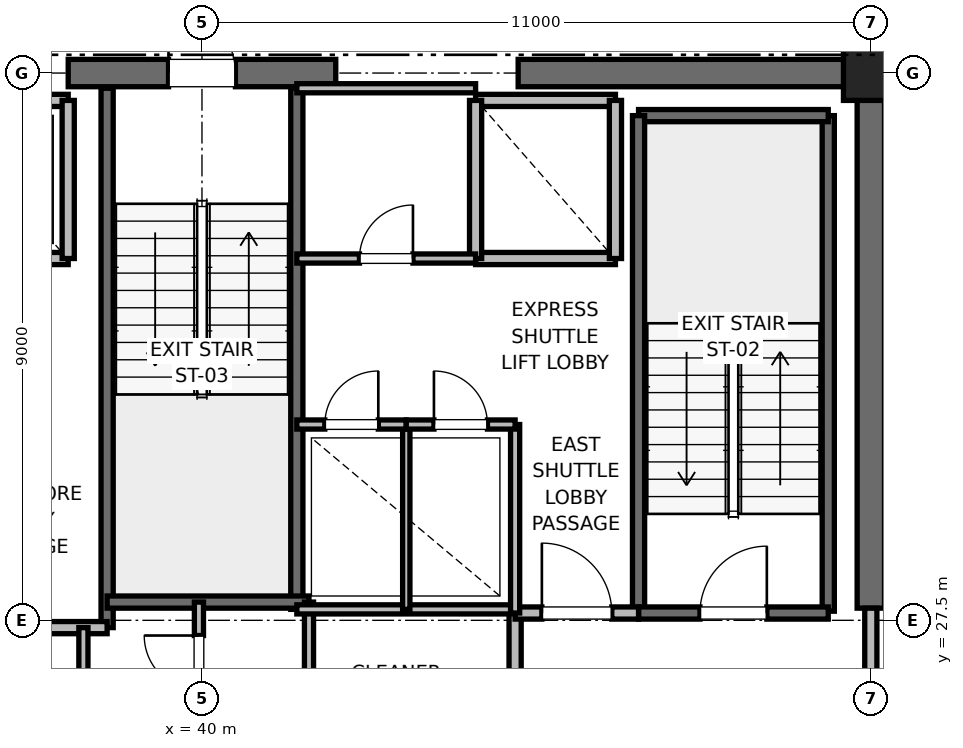
"""IFC4 building model, lengths in metres.
Left out: names, types, materials, properties, quantities, classifications, styles, units other than length and angle.
Written with IfcOpenShell. Run it as: python <this file> out.ifc"""

import sys

from ifc_helpers import new_model, si_unit, direction, frame, frame_2d, origin, origin_2d, place, context, subcontext, project, spatial, rectangle, extrude, element, fill, save


model = new_model("IFC4")
c1 = context("Model", 3, precision=1e-05, world=origin(), true_north=direction((0.0, 1.0)))
c2 = subcontext(c1, "Body", "Model", "MODEL_VIEW")
j1 = project(units=[si_unit("LENGTHUNIT", "METRE"), si_unit("PLANEANGLEUNIT", "RADIAN")], contexts=[c1])
p1 = place(None, origin())
s1 = spatial("IfcSite", under=j1, at=p1, CompositionType="ELEMENT")
p2 = place(p1, origin())
s2 = spatial("IfcBuilding", under=s1, at=p2, CompositionType="ELEMENT")
p3 = place(p2, frame((0.0, 0.0, 279.2)))
s3 = spatial("IfcBuildingStorey", under=s2, at=p3, CompositionType="ELEMENT", Elevation=279.2)
p4 = place(p3, frame((51.0, 36.5, 0.0), z_axis=(0.0, 0.0, 1.0), x_axis=(1.0, 0.0, 0.0)))
e1 = element("IfcColumn", 1, at=p4, inside=s3, PredefinedType="PILASTER", context=c2, shape_type="SweptSolid", body=[
    extrude(rectangle(XDim=0.9, YDim=0.9, at=origin_2d()), origin(), (0.0, 0.0, 1.0), 4.0),
])
p5 = place(p3, frame((37.8, 36.5, 0.0), z_axis=(0.0, 0.0, 1.0), x_axis=(1.0, 0.0, 0.0)))
e2 = element("IfcWall", 2, at=p5, inside=s3, PredefinedType="SHEAR", context=c2, shape_type="SweptSolid", body=[
    extrude(rectangle(XDim=4.4, YDim=0.45, at=frame_2d((2.2, 0.0))), origin(), (0.0, 0.0, 1.0), 3.785),
])
p6 = place(p5, frame((1.65, 0.0, 0.0)))
e3 = element("IfcOpeningElement", 3, at=p6, cuts=e2, PredefinedType="OPENING", context=c2, shape_type="SweptSolid", body=[
    extrude(rectangle(XDim=1.1, YDim=2.15, at=frame_2d((0.55, 1.075))), frame((0.0, 0.225, 0.0), z_axis=(0.0, -1.0, 0.0), x_axis=(1.0, 0.0, 0.0)), (0.0, 0.0, 1.0), 0.45),
])
p7 = place(p3, frame((45.2, 36.5, 0.0), z_axis=(0.0, 0.0, 1.0), x_axis=(1.0, 0.0, 0.0)))
e4 = element("IfcWall", 4, at=p7, inside=s3, PredefinedType="SHEAR", context=c2, shape_type="SweptSolid", body=[
    extrude(rectangle(XDim=5.8, YDim=0.45, at=frame_2d((2.9, 0.0))), origin(), (0.0, 0.0, 1.0), 3.785),
])
p8 = place(p3, frame((51.0, 27.7, 0.0), z_axis=(0.0, 0.0, 1.0), x_axis=(0.0, 1.0, 0.0)))
e5 = element("IfcWall", 5, at=p8, inside=s3, PredefinedType="SHEAR", context=c2, shape_type="SweptSolid", body=[
    extrude(rectangle(XDim=8.8, YDim=0.45, at=frame_2d((4.4, 0.0))), origin(), (0.0, 0.0, 1.0), 3.785),
])
p9 = place(p3, frame((50.3, 27.65, 0.0), z_axis=(0.0, 0.0, 1.0), x_axis=(0.0, 1.0, 0.0)))
e6 = element("IfcWall", 6, at=p9, inside=s3, PredefinedType="SOLIDWALL", context=c2, shape_type="SweptSolid", body=[
    extrude(rectangle(XDim=8.15, YDim=0.2, at=frame_2d((4.075, 0.0))), origin(), (0.0, 0.0, 1.0), 3.785),
])
p10 = place(p3, frame((47.18, 35.8, 0.0), z_axis=(0.0, 0.0, 1.0), x_axis=(1.0, 0.0, 0.0)))
e7 = element("IfcWall", 7, at=p10, inside=s3, PredefinedType="SOLIDWALL", context=c2, shape_type="SweptSolid", body=[
    extrude(rectangle(XDim=3.12, YDim=0.2, at=frame_2d((1.56, 0.0))), origin(), (0.0, 0.0, 1.0), 3.785),
])
p11 = place(p3, frame((47.18, 27.62, 0.0), z_axis=(0.0, 0.0, 1.0), x_axis=(0.0, 1.0, 0.0)))
e8 = element("IfcWall", 8, at=p11, inside=s3, PredefinedType="SOLIDWALL", context=c2, shape_type="SweptSolid", body=[
    extrude(rectangle(XDim=8.18, YDim=0.2, at=frame_2d((4.09, 0.0))), origin(), (0.0, 0.0, 1.0), 3.785),
])
p12 = place(p3, frame((47.18, 27.62, 0.0), z_axis=(0.0, 0.0, 1.0), x_axis=(1.0, 0.0, 0.0)))
e9 = element("IfcWall", 9, at=p12, inside=s3, PredefinedType="SOLIDWALL", context=c2, shape_type="SweptSolid", body=[
    extrude(rectangle(XDim=3.12, YDim=0.2, at=frame_2d((1.56, 0.0))), origin(), (0.0, 0.0, 1.0), 3.785),
])
p13 = place(p12, frame((1.01, 0.0, 0.0)))
e10 = element("IfcOpeningElement", 10, at=p13, cuts=e9, PredefinedType="OPENING", context=c2, shape_type="SweptSolid", body=[
    extrude(rectangle(XDim=1.1, YDim=2.15, at=frame_2d((0.55, 1.075))), frame((0.0, 0.1, 0.0), z_axis=(0.0, -1.0, 0.0), x_axis=(1.0, 0.0, 0.0)), (0.0, 0.0, 1.0), 0.2),
])
p14 = place(p3, frame((38.44, 27.38, 0.0), z_axis=(0.0, 0.0, 1.0), x_axis=(0.0, 1.0, 0.0)))
e11 = element("IfcWall", 11, at=p14, inside=s3, PredefinedType="SOLIDWALL", context=c2, shape_type="SweptSolid", body=[
    extrude(rectangle(XDim=8.87, YDim=0.2, at=frame_2d((4.435, 0.0))), origin(), (0.0, 0.0, 1.0), 3.785),
])
p15 = place(p3, frame((41.56, 27.68, 0.0), z_axis=(0.0, 0.0, 1.0), x_axis=(0.0, 1.0, 0.0)))
e12 = element("IfcWall", 12, at=p15, inside=s3, PredefinedType="SOLIDWALL", context=c2, shape_type="SweptSolid", body=[
    extrude(rectangle(XDim=8.57, YDim=0.2, at=frame_2d((4.285, 0.0))), origin(), (0.0, 0.0, 1.0), 3.785),
])
p16 = place(p3, frame((38.44, 27.8, 0.0), z_axis=(0.0, 0.0, 1.0), x_axis=(1.0, 0.0, 0.0)))
e13 = element("IfcWall", 13, at=p16, inside=s3, PredefinedType="SOLIDWALL", context=c2, shape_type="SweptSolid", body=[
    extrude(rectangle(XDim=3.32, YDim=0.2, at=frame_2d((1.66, 0.0))), origin(), (0.0, 0.0, 1.0), 3.785),
])
p17 = place(p3, frame((32.82, 27.38, 0.0), z_axis=(0.0, 0.0, 1.0), x_axis=(1.0, 0.0, 0.0)))
e14 = element("IfcWall", 14, at=p17, inside=s3, PredefinedType="PARTITIONING", context=c2, shape_type="SweptSolid", body=[
    extrude(rectangle(XDim=5.62, YDim=0.2, at=frame_2d((2.81, 0.0))), origin(), (0.0, 0.0, 1.0), 3.785),
])
p18 = place(p3, frame((45.15, 24.25, 0.0), z_axis=(0.0, 0.0, 1.0), x_axis=(0.0, 1.0, 0.0)))
e15 = element("IfcWall", 15, at=p18, inside=s3, PredefinedType="PARTITIONING", context=c2, shape_type="SweptSolid", body=[
    extrude(rectangle(XDim=3.37, YDim=0.2, at=frame_2d((1.685, 0.0))), origin(), (0.0, 0.0, 1.0), 3.785),
])
p19 = place(p3, frame((45.15, 27.62, 0.0), z_axis=(0.0, 0.0, 1.0), x_axis=(1.0, 0.0, 0.0)))
e16 = element("IfcWall", 16, at=p19, inside=s3, PredefinedType="PARTITIONING", context=c2, shape_type="SweptSolid", body=[
    extrude(rectangle(XDim=2.03, YDim=0.2, at=frame_2d((1.015, 0.0))), origin(), (0.0, 0.0, 1.0), 3.785),
])
p20 = place(p19, frame((0.44, 0.0, 0.0)))
e17 = element("IfcOpeningElement", 17, at=p20, cuts=e16, PredefinedType="OPENING", context=c2, shape_type="SweptSolid", body=[
    extrude(rectangle(XDim=1.15, YDim=2.2, at=frame_2d((0.575, 1.1))), frame((0.0, 0.1, 0.0), z_axis=(0.0, -1.0, 0.0), x_axis=(1.0, 0.0, 0.0)), (0.0, 0.0, 1.0), 0.2),
])
p21 = place(p3, frame((51.0, 24.3, 0.0), z_axis=(0.0, 0.0, 1.0), x_axis=(0.0, 1.0, 0.0)))
e18 = element("IfcWall", 18, at=p21, inside=s3, PredefinedType="PARTITIONING", context=c2, shape_type="SweptSolid", body=[
    extrude(rectangle(XDim=3.4, YDim=0.2, at=frame_2d((1.7, 0.0))), origin(), (0.0, 0.0, 1.0), 2.865),
])
p22 = place(p21, frame((1.125, 0.0, 0.0)))
e19 = element("IfcOpeningElement", 19, at=p22, cuts=e18, PredefinedType="OPENING", context=c2, shape_type="SweptSolid", body=[
    extrude(rectangle(XDim=1.15, YDim=2.2, at=frame_2d((0.575, 1.1))), frame((0.0, 0.1, 0.0), z_axis=(0.0, -1.0, 0.0), x_axis=(1.0, 0.0, 0.0)), (0.0, 0.0, 1.0), 0.2),
])
p23 = place(p3, frame((35.5, 33.45, 0.0), z_axis=(0.0, 0.0, 1.0), x_axis=(1.0, 0.0, 0.0)))
e20 = element("IfcWall", 20, at=p23, inside=s3, PredefinedType="SOLIDWALL", context=c2, shape_type="SweptSolid", body=[
    extrude(rectangle(XDim=2.3, YDim=0.2, at=frame_2d((1.15, 0.0))), origin(), (0.0, 0.0, 1.0), 3.785),
])
p24 = place(p23, frame((0.6, 0.0, 0.0)))
e21 = element("IfcOpeningElement", 21, at=p24, cuts=e20, PredefinedType="OPENING", context=c2, shape_type="SweptSolid", body=[
    extrude(rectangle(XDim=1.1, YDim=2.2, at=frame_2d((0.55, 1.1))), frame((0.0, 0.1, 0.0), z_axis=(0.0, -1.0, 0.0), x_axis=(1.0, 0.0, 0.0)), (0.0, 0.0, 1.0), 0.2),
])
p25 = place(p3, frame((37.8, 36.05, 0.0), z_axis=(0.0, 0.0, 1.0), x_axis=(-1.0, 0.0, 0.0)))
e22 = element("IfcWall", 22, at=p25, inside=s3, PredefinedType="SOLIDWALL", context=c2, shape_type="SweptSolid", body=[
    extrude(rectangle(XDim=2.3, YDim=0.2, at=frame_2d((1.15, 0.0))), origin(), (0.0, 0.0, 1.0), 2.865),
])
p26 = place(p3, frame((37.8, 33.45, 0.0), z_axis=(0.0, 0.0, 1.0), x_axis=(0.0, 1.0, 0.0)))
e23 = element("IfcWall", 23, at=p26, inside=s3, PredefinedType="SOLIDWALL", context=c2, shape_type="SweptSolid", body=[
    extrude(rectangle(XDim=2.6, YDim=0.2, at=frame_2d((1.3, 0.0))), origin(), (0.0, 0.0, 1.0), 2.865),
])
p27 = place(p3, frame((44.5, 33.45, 0.0), z_axis=(0.0, 0.0, 1.0), x_axis=(1.0, 0.0, 0.0)))
e24 = element("IfcWall", 24, at=p27, inside=s3, PredefinedType="SOLIDWALL", context=c2, shape_type="SweptSolid", body=[
    extrude(rectangle(XDim=2.3, YDim=0.2, at=frame_2d((1.15, 0.0))), origin(), (0.0, 0.0, 1.0), 3.785),
])
p28 = place(p3, frame((46.8, 36.05, 0.0), z_axis=(0.0, 0.0, 1.0), x_axis=(-1.0, 0.0, 0.0)))
e25 = element("IfcWall", 25, at=p28, inside=s3, PredefinedType="SOLIDWALL", context=c2, shape_type="SweptSolid", body=[
    extrude(rectangle(XDim=2.3, YDim=0.2, at=frame_2d((1.15, 0.0))), origin(), (0.0, 0.0, 1.0), 2.865),
])
p29 = place(p3, frame((44.5, 36.05, 0.0), z_axis=(0.0, 0.0, 1.0), x_axis=(0.0, -1.0, 0.0)))
e26 = element("IfcWall", 26, at=p29, inside=s3, PredefinedType="SOLIDWALL", context=c2, shape_type="SweptSolid", body=[
    extrude(rectangle(XDim=2.6, YDim=0.2, at=frame_2d((1.3, 0.0))), origin(), (0.0, 0.0, 1.0), 2.865),
])
p30 = place(p3, frame((46.8, 33.45, 0.0), z_axis=(0.0, 0.0, 1.0), x_axis=(0.0, 1.0, 0.0)))
e27 = element("IfcWall", 27, at=p30, inside=s3, PredefinedType="SOLIDWALL", context=c2, shape_type="SweptSolid", body=[
    extrude(rectangle(XDim=2.6, YDim=0.2, at=frame_2d((1.3, 0.0))), origin(), (0.0, 0.0, 1.0), 3.785),
])
p31 = place(p3, frame((41.76, 23.8, 0.0), z_axis=(0.0, 0.0, 1.0), x_axis=(0.0, 1.0, 0.0)))
e28 = element("IfcWall", 28, at=p31, inside=s3, PredefinedType="PARTITIONING", context=c2, shape_type="SweptSolid", body=[
    extrude(rectangle(XDim=4.0, YDim=0.15, at=frame_2d((2.0, 0.0))), origin(), (0.0, 0.0, 1.0), 2.85),
])
p32 = place(p3, frame((39.95, 25.8, 0.0), z_axis=(0.0, 0.0, 1.0), x_axis=(0.0, 1.0, 0.0)))
e29 = element("IfcWall", 29, at=p32, inside=s3, PredefinedType="PARTITIONING", context=c2, shape_type="SweptSolid", body=[
    extrude(rectangle(XDim=2.0, YDim=0.15, at=frame_2d((1.0, 0.0))), origin(), (0.0, 0.0, 1.0), 2.85),
])
p33 = place(p32, frame((0.55, 0.0, 0.0)))
e30 = element("IfcOpeningElement", 30, at=p33, cuts=e29, PredefinedType="OPENING", context=c2, shape_type="SweptSolid", body=[
    extrude(rectangle(XDim=0.9, YDim=2.1, at=frame_2d((0.45, 1.05))), frame((0.0, 0.075, 0.0), z_axis=(0.0, -1.0, 0.0), x_axis=(1.0, 0.0, 0.0)), (0.0, 0.0, 1.0), 0.15),
])
p34 = place(p3, frame((38.05, 23.06, 0.0), z_axis=(0.0, 0.0, 1.0), x_axis=(0.0, 1.0, 0.0)))
e31 = element("IfcWall", 31, at=p34, inside=s3, PredefinedType="PARTITIONING", context=c2, shape_type="SweptSolid", body=[
    extrude(rectangle(XDim=4.32, YDim=0.15, at=frame_2d((2.16, 0.0))), origin(), (0.0, 0.0, 1.0), 2.85),
])
p35 = place(p34, frame((1.66, 0.0, 0.0)))
e32 = element("IfcOpeningElement", 32, at=p35, cuts=e31, PredefinedType="OPENING", context=c2, shape_type="SweptSolid", body=[
    extrude(rectangle(XDim=1.0, YDim=2.15, at=frame_2d((0.5, 1.075))), frame((0.0, 0.075, 0.0), z_axis=(0.0, -1.0, 0.0), x_axis=(1.0, 0.0, 0.0)), (0.0, 0.0, 1.0), 0.15),
])
p36 = place(p3, frame((41.56, 27.68, 0.0), z_axis=(0.0, 0.0, 1.0), x_axis=(1.0, 0.0, 0.0)))
e33 = element("IfcWall", 33, at=p36, inside=s3, PredefinedType="PARTITIONING", context=c2, shape_type="SweptSolid", body=[
    extrude(rectangle(XDim=3.59, YDim=0.15, at=frame_2d((1.795, 0.0))), origin(), (0.0, 0.0, 1.0), 2.85),
])
p37 = place(p3, frame((45.15, 27.62, 0.0), z_axis=(0.0, 0.0, 1.0), x_axis=(0.0, 1.0, 0.0)))
e34 = element("IfcWall", 34, at=p37, inside=s3, PredefinedType="PARTITIONING", context=c2, shape_type="SweptSolid", body=[
    extrude(rectangle(XDim=3.1, YDim=0.15, at=frame_2d((1.55, 0.0))), origin(), (0.0, 0.0, 1.0), 2.85),
])
p38 = place(p3, frame((43.36, 27.68, 0.0), z_axis=(0.0, 0.0, 1.0), x_axis=(0.0, 1.0, 0.0)))
e35 = element("IfcWall", 35, at=p38, inside=s3, PredefinedType="PARTITIONING", context=c2, shape_type="SweptSolid", body=[
    extrude(rectangle(XDim=3.04, YDim=0.12, at=frame_2d((1.52, 0.0))), origin(), (0.0, 0.0, 1.0), 2.85),
])
p39 = place(p3, frame((41.56, 30.72, 0.0), z_axis=(0.0, 0.0, 1.0), x_axis=(1.0, 0.0, 0.0)))
e36 = element("IfcWall", 36, at=p39, inside=s3, PredefinedType="PARTITIONING", context=c2, shape_type="SweptSolid", body=[
    extrude(rectangle(XDim=1.8, YDim=0.15, at=frame_2d((0.9, 0.0))), origin(), (0.0, 0.0, 1.0), 2.85),
])
p40 = place(p39, frame((0.46, 0.0, 0.0)))
e37 = element("IfcOpeningElement", 37, at=p40, cuts=e36, PredefinedType="OPENING", context=c2, shape_type="SweptSolid", body=[
    extrude(rectangle(XDim=0.88, YDim=2.1, at=frame_2d((0.44, 1.05))), frame((0.0, 0.075, 0.0), z_axis=(0.0, -1.0, 0.0), x_axis=(1.0, 0.0, 0.0)), (0.0, 0.0, 1.0), 0.15),
])
p41 = place(p3, frame((43.36, 30.72, 0.0), z_axis=(0.0, 0.0, 1.0), x_axis=(1.0, 0.0, 0.0)))
e38 = element("IfcWall", 38, at=p41, inside=s3, PredefinedType="PARTITIONING", context=c2, shape_type="SweptSolid", body=[
    extrude(rectangle(XDim=1.79, YDim=0.15, at=frame_2d((0.895, 0.0))), origin(), (0.0, 0.0, 1.0), 2.85),
])
p42 = place(p41, frame((0.455, 0.0, 0.0)))
e39 = element("IfcOpeningElement", 39, at=p42, cuts=e38, PredefinedType="OPENING", context=c2, shape_type="SweptSolid", body=[
    extrude(rectangle(XDim=0.88, YDim=2.1, at=frame_2d((0.44, 1.05))), frame((0.0, 0.075, 0.0), z_axis=(0.0, -1.0, 0.0), x_axis=(1.0, 0.0, 0.0)), (0.0, 0.0, 1.0), 0.15),
])
p43 = place(p3, frame((41.56, 36.25, 0.0), z_axis=(0.0, 0.0, 1.0), x_axis=(1.0, 0.0, 0.0)))
e40 = element("IfcWall", 40, at=p43, inside=s3, PredefinedType="PARTITIONING", context=c2, shape_type="SweptSolid", body=[
    extrude(rectangle(XDim=2.94, YDim=0.15, at=frame_2d((1.47, 0.0))), origin(), (0.0, 0.0, 1.0), 2.85),
])
p44 = place(p3, frame((41.56, 33.45, 0.0), z_axis=(0.0, 0.0, 1.0), x_axis=(1.0, 0.0, 0.0)))
e41 = element("IfcWall", 41, at=p44, inside=s3, PredefinedType="PARTITIONING", context=c2, shape_type="SweptSolid", body=[
    extrude(rectangle(XDim=2.94, YDim=0.15, at=frame_2d((1.47, 0.0))), origin(), (0.0, 0.0, 1.0), 2.85),
])
p45 = place(p44, frame((1.03, 0.0, 0.0)))
e42 = element("IfcOpeningElement", 42, at=p45, cuts=e41, PredefinedType="OPENING", context=c2, shape_type="SweptSolid", body=[
    extrude(rectangle(XDim=0.88, YDim=2.1, at=frame_2d((0.44, 1.05))), frame((0.0, 0.075, 0.0), z_axis=(0.0, -1.0, 0.0), x_axis=(1.0, 0.0, 0.0)), (0.0, 0.0, 1.0), 0.15),
])
p46 = place(p13, origin())
e43 = element("IfcDoor", 43, at=p46, inside=s3, OperationType="SINGLE_SWING_RIGHT", PredefinedType="DOOR", context=c2, shape_type="SweptSolid", body=[
    extrude(rectangle(XDim=1.1, YDim=2.15, at=frame_2d((0.55, 1.075))), frame((0.0, 0.025, 0.0), z_axis=(0.0, -1.0, 0.0), x_axis=(1.0, 0.0, 0.0)), (0.0, 0.0, 1.0), 0.05),
])
fill(e10, e43)
p47 = place(p6, origin())
e44 = element("IfcDoor", 44, at=p47, inside=s3, OperationType="SINGLE_SWING_LEFT", PredefinedType="DOOR", context=c2, shape_type="SweptSolid", body=[
    extrude(rectangle(XDim=1.1, YDim=2.15, at=frame_2d((0.55, 1.075))), frame((0.0, 0.025, 0.0), z_axis=(0.0, -1.0, 0.0), x_axis=(1.0, 0.0, 0.0)), (0.0, 0.0, 1.0), 0.05),
])
fill(e3, e44)
p48 = place(p20, origin())
e45 = element("IfcDoor", 45, at=p48, inside=s3, OperationType="SINGLE_SWING_LEFT", PredefinedType="DOOR", context=c2, shape_type="SweptSolid", body=[
    extrude(rectangle(XDim=1.15, YDim=2.2, at=frame_2d((0.575, 1.1))), frame((0.0, 0.025, 0.0), z_axis=(0.0, -1.0, 0.0), x_axis=(1.0, 0.0, 0.0)), (0.0, 0.0, 1.0), 0.05),
])
fill(e17, e45)
p49 = place(p33, origin())
e46 = element("IfcDoor", 46, at=p49, inside=s3, OperationType="SINGLE_SWING_RIGHT", PredefinedType="DOOR", context=c2, shape_type="SweptSolid", body=[
    extrude(rectangle(XDim=0.9, YDim=2.1, at=frame_2d((0.45, 1.05))), frame((0.0, 0.025, 0.0), z_axis=(0.0, -1.0, 0.0), x_axis=(1.0, 0.0, 0.0)), (0.0, 0.0, 1.0), 0.05),
])
fill(e30, e46)
p50 = place(p40, origin())
e47 = element("IfcDoor", 47, at=p50, inside=s3, OperationType="SINGLE_SWING_RIGHT", PredefinedType="DOOR", context=c2, shape_type="SweptSolid", body=[
    extrude(rectangle(XDim=0.88, YDim=2.1, at=frame_2d((0.44, 1.05))), frame((0.0, 0.025, 0.0), z_axis=(0.0, -1.0, 0.0), x_axis=(1.0, 0.0, 0.0)), (0.0, 0.0, 1.0), 0.05),
])
fill(e37, e47)
p51 = place(p42, origin())
e48 = element("IfcDoor", 48, at=p51, inside=s3, OperationType="SINGLE_SWING_LEFT", PredefinedType="DOOR", context=c2, shape_type="SweptSolid", body=[
    extrude(rectangle(XDim=0.88, YDim=2.1, at=frame_2d((0.44, 1.05))), frame((0.0, 0.025, 0.0), z_axis=(0.0, -1.0, 0.0), x_axis=(1.0, 0.0, 0.0)), (0.0, 0.0, 1.0), 0.05),
])
fill(e39, e48)
p52 = place(p45, origin())
e49 = element("IfcDoor", 49, at=p52, inside=s3, OperationType="SINGLE_SWING_RIGHT", PredefinedType="DOOR", context=c2, shape_type="SweptSolid", body=[
    extrude(rectangle(XDim=0.88, YDim=2.1, at=frame_2d((0.44, 1.05))), frame((0.0, 0.025, 0.0), z_axis=(0.0, -1.0, 0.0), x_axis=(1.0, 0.0, 0.0)), (0.0, 0.0, 1.0), 0.05),
])
fill(e42, e49)
save(model, sys.argv[1])
